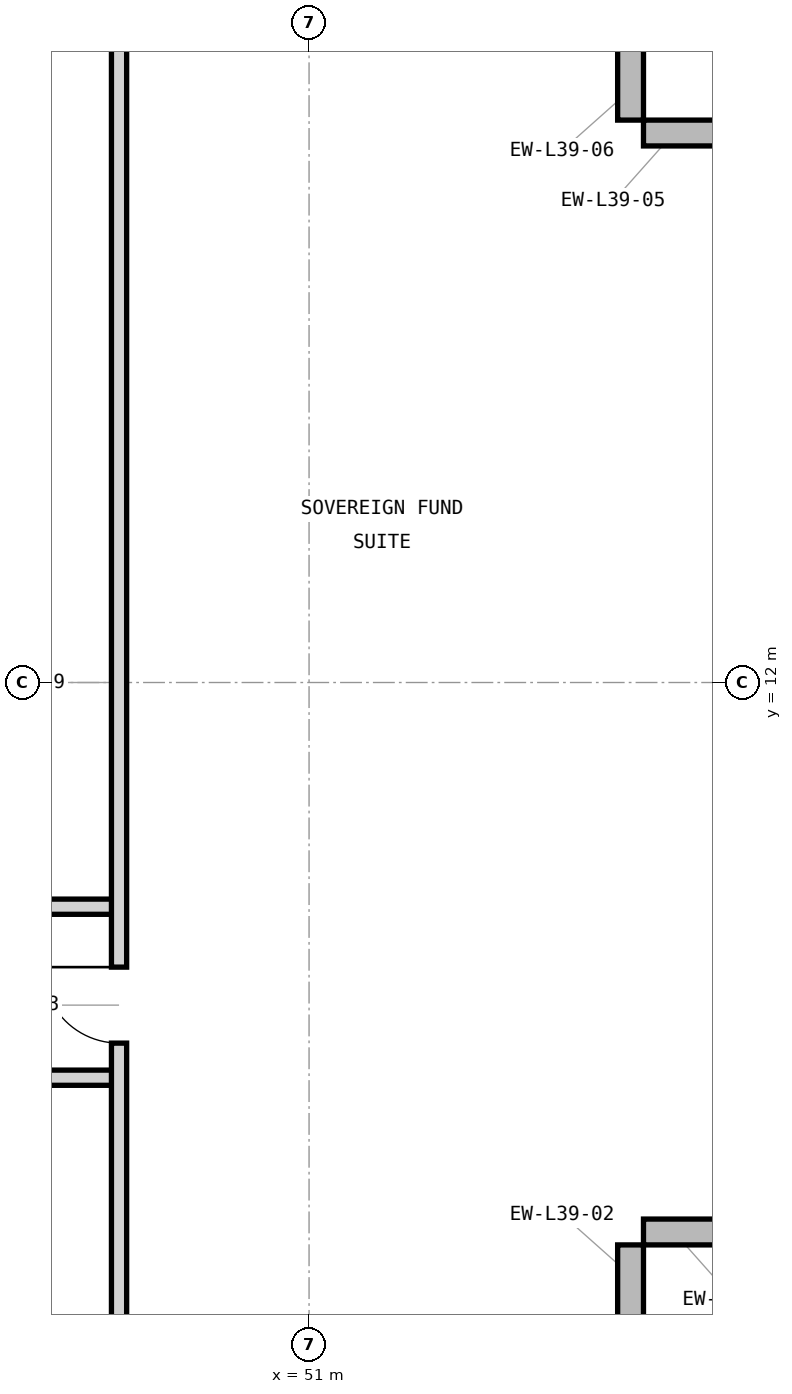
"""IFC4 building model, lengths in metres.
Left out: names, types, materials, properties, quantities, classifications, styles, units other than length and angle.
Written with IfcOpenShell. Run it as: python <this file> out.ifc"""

import sys

from ifc_helpers import new_model, si_unit, direction, frame, frame_2d, origin, place, context, subcontext, project, spatial, rectangle, extrude, element, fill, save


model = new_model("IFC4")
c1 = context("Model", 3, precision=1e-05, world=origin(), true_north=direction((0.0, 1.0)))
c2 = subcontext(c1, "Body", "Model", "MODEL_VIEW")
j1 = project(units=[si_unit("LENGTHUNIT", "METRE"), si_unit("PLANEANGLEUNIT", "RADIAN")], contexts=[c1])
p1 = place(None, origin())
s1 = spatial("IfcSite", under=j1, at=p1, CompositionType="ELEMENT")
p2 = place(p1, origin())
s2 = spatial("IfcBuilding", under=s1, at=p2, CompositionType="ELEMENT")
p3 = place(p2, frame((0.0, 0.0, 164.4)))
s3 = spatial("IfcBuildingStorey", under=s2, at=p3, CompositionType="ELEMENT", Elevation=164.4)
for number, where, z_axis, x_axis in (
    (1, (55.23, 3.0, 0.0), (0.0, 0.0, 1.0), (0.0, 1.0, 0.0)),
    (2, (55.4, 4.77, 0.0), (0.0, 0.0, 1.0), (1.0, 0.0, 0.0)),
    (3, (57.0, 19.23, 0.0), (0.0, 0.0, 1.0), (-1.0, 0.0, 0.0)),
    (4, (55.23, 19.4, 0.0), (0.0, 0.0, 1.0), (0.0, 1.0, 0.0)),
):
    element("IfcWall", number, at=place(p3, frame(where, z_axis=z_axis, x_axis=x_axis)), inside=s3, PredefinedType="STANDARD", context=c2, shape_type="SweptSolid", body=[
        extrude(rectangle(XDim=1.6, YDim=0.34, at=frame_2d((0.8, 0.0))), origin(), (0.0, 0.0, 1.0), 3.7),
    ])
p4 = place(p3, frame((38.1, 6.8, 0.0), z_axis=(0.0, 0.0, 1.0), x_axis=(1.0, 0.0, 0.0)))
e5 = element("IfcWall", 5, at=p4, inside=s3, PredefinedType="PARTITIONING", context=c2, shape_type="SweptSolid", body=[
    extrude(rectangle(XDim=10.4, YDim=0.2, at=frame_2d((5.2, 0.0))), origin(), (0.0, 0.0, 1.0), 3.69),
])
p5 = place(p4, frame((4.7, 0.0, 0.0)))
e6 = element("IfcOpeningElement", 6, at=p5, cuts=e5, PredefinedType="OPENING", context=c2, shape_type="SweptSolid", body=[
    extrude(rectangle(XDim=1.0, YDim=2.15, at=frame_2d((0.5, 1.075))), frame((0.0, 0.11, 0.0), z_axis=(0.0, -1.0, 0.0), x_axis=(1.0, 0.0, 0.0)), (0.0, 0.0, 1.0), 0.22),
])
p6 = place(p3, frame((38.1, 9.05, 0.0), z_axis=(0.0, 0.0, 1.0), x_axis=(1.0, 0.0, 0.0)))
e7 = element("IfcWall", 7, at=p6, inside=s3, PredefinedType="PARTITIONING", context=c2, shape_type="SweptSolid", body=[
    extrude(rectangle(XDim=10.4, YDim=0.2, at=frame_2d((5.2, 0.0))), origin(), (0.0, 0.0, 1.0), 3.283),
])
p7 = place(p6, frame((4.45, 0.0, 0.0)))
e8 = element("IfcOpeningElement", 8, at=p7, cuts=e7, PredefinedType="OPENING", context=c2, shape_type="SweptSolid", body=[
    extrude(rectangle(XDim=1.5, YDim=2.3, at=frame_2d((0.75, 1.15))), frame((0.0, 0.11, 0.0), z_axis=(0.0, -1.0, 0.0), x_axis=(1.0, 0.0, 0.0)), (0.0, 0.0, 1.0), 0.22),
])
p8 = place(p3, frame((48.5, 3.18, 0.0), z_axis=(0.0, 0.0, 1.0), x_axis=(0.0, 1.0, 0.0)))
e9 = element("IfcWall", 9, at=p8, inside=s3, PredefinedType="PARTITIONING", context=c2, shape_type="SweptSolid", body=[
    extrude(rectangle(XDim=17.64, YDim=0.2, at=frame_2d((8.82, 0.0))), origin(), (0.0, 0.0, 1.0), 3.69),
])
p9 = place(p8, frame((4.075, 0.0, 0.0)))
e10 = element("IfcOpeningElement", 10, at=p9, cuts=e9, PredefinedType="OPENING", context=c2, shape_type="SweptSolid", body=[
    extrude(rectangle(XDim=1.0, YDim=2.15, at=frame_2d((0.5, 1.075))), frame((0.0, 0.11, 0.0), z_axis=(0.0, -1.0, 0.0), x_axis=(1.0, 0.0, 0.0)), (0.0, 0.0, 1.0), 0.22),
])
p10 = place(p9, origin())
e11 = element("IfcDoor", 11, at=p10, inside=s3, OperationType="SINGLE_SWING_RIGHT", PredefinedType="DOOR", context=c2, shape_type="SweptSolid", body=[
    extrude(rectangle(XDim=1.0, YDim=2.15, at=frame_2d((0.5, 1.075))), frame((0.0, 0.025, 0.0), z_axis=(0.0, -1.0, 0.0), x_axis=(1.0, 0.0, 0.0)), (0.0, 0.0, 1.0), 0.05),
])
fill(e10, e11)
save(model, sys.argv[1])
